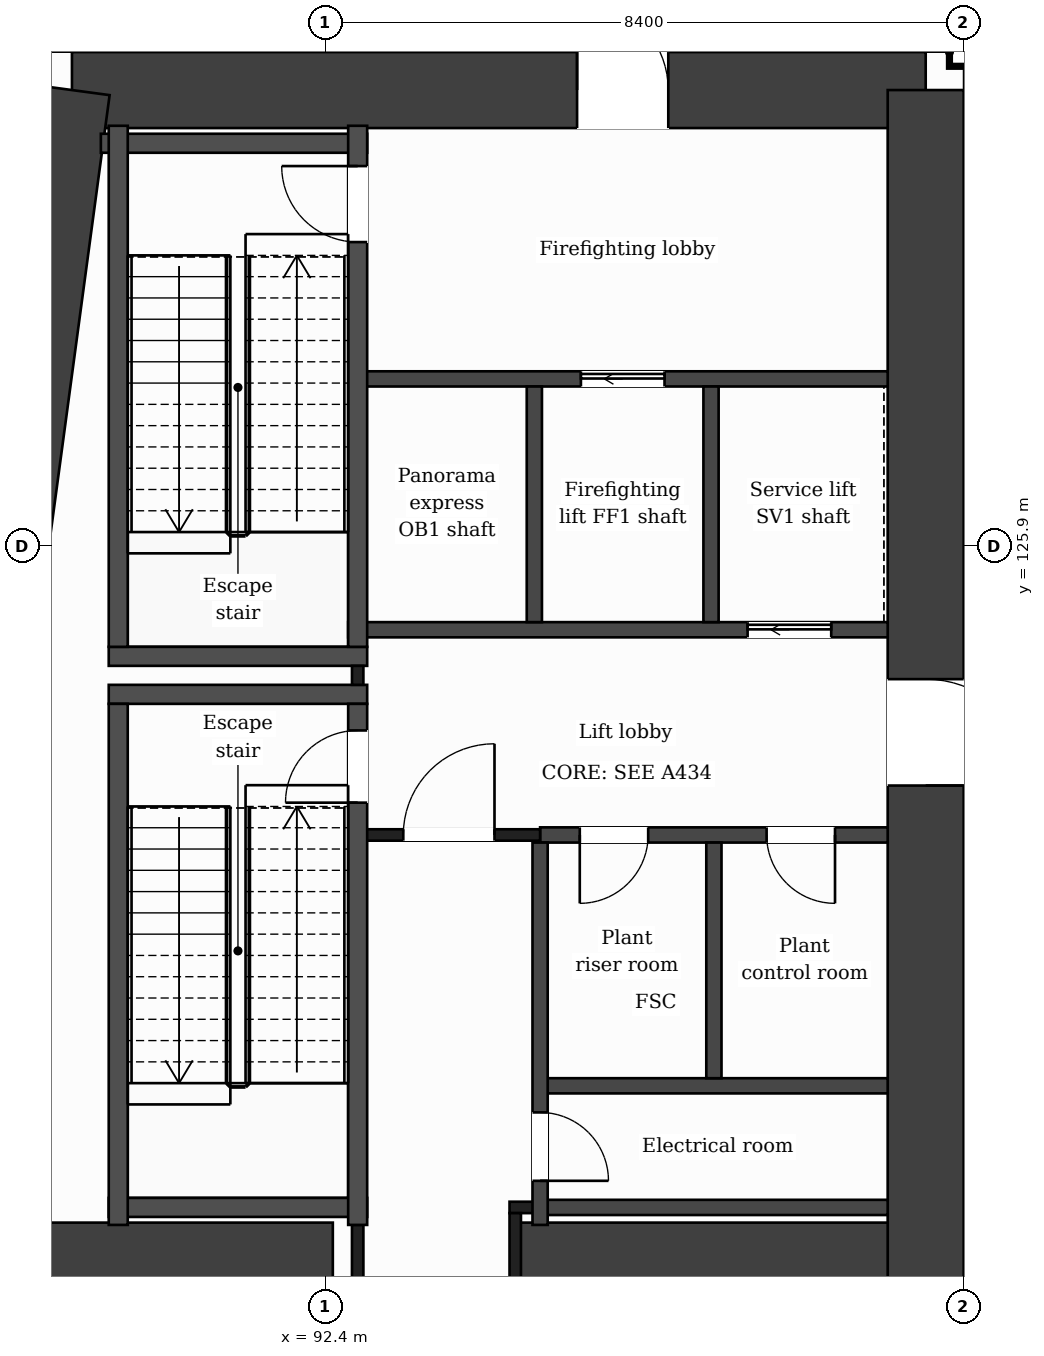
"""IFC4 building model, lengths in metres.
Left out: names, types, materials, properties, quantities, classifications, styles, units other than length and angle.
Written with IfcOpenShell. Run it as: python <this file> out.ifc"""

import sys

from ifc_helpers import new_model, si_unit, direction, frame, frame_2d, origin, place, context, subcontext, project, spatial, rectangle, extrude, element, fill, save


model = new_model("IFC4")
c1 = context("Model", 3, precision=1e-05, world=origin(), true_north=direction((0.0, 1.0)))
c2 = subcontext(c1, "Body", "Model", "MODEL_VIEW")
j1 = project(units=[si_unit("LENGTHUNIT", "METRE"), si_unit("PLANEANGLEUNIT", "RADIAN")], contexts=[c1])
p1 = place(None, origin())
s1 = spatial("IfcSite", under=j1, at=p1, CompositionType="ELEMENT")
p2 = place(p1, origin())
s2 = spatial("IfcBuilding", under=s1, at=p2, CompositionType="ELEMENT")
p3 = place(p2, frame((0.0, 0.0, 142.8)))
s3 = spatial("IfcBuildingStorey", under=s2, at=p3, CompositionType="ELEMENT", Elevation=142.8)
p4 = place(p3, frame((89.068, 131.9, 0.0), z_axis=(0.0, 0.0, 1.0), x_axis=(1.0, 0.0, 0.0)))
e1 = element("IfcWall", 1, at=p4, inside=s3, PredefinedType="SHEAR", context=c2, shape_type="SweptSolid", body=[
    extrude(rectangle(XDim=11.232, YDim=1.0, at=frame_2d((5.616, 0.0))), origin(), (0.0, 0.0, 1.0), 5.0),
])
p5 = place(p4, frame((6.646, 0.0, 0.0)))
e2 = element("IfcOpeningElement", 2, at=p5, cuts=e1, PredefinedType="OPENING", context=c2, shape_type="SweptSolid", body=[
    extrude(rectangle(XDim=1.2, YDim=2.1, at=frame_2d((0.6, 1.05))), frame((0.0, 0.51, 0.0), z_axis=(0.0, -1.0, 0.0), x_axis=(1.0, 0.0, 0.0)), (0.0, 0.0, 1.0), 1.02),
])
p6 = place(p3, frame((100.3, 131.9, 0.0), z_axis=(0.0, 0.0, 1.0), x_axis=(0.0, -1.0, 0.0)))
e3 = element("IfcWall", 3, at=p6, inside=s3, PredefinedType="SHEAR", context=c2, shape_type="SweptSolid", body=[
    extrude(rectangle(XDim=21.0, YDim=1.0, at=frame_2d((10.5, 0.0))), origin(), (0.0, 0.0, 1.0), 5.0),
])
p7 = place(p6, frame((18.7, 0.0, 0.0)))
e4 = element("IfcOpeningElement", 4, at=p7, cuts=e3, PredefinedType="OPENING", context=c2, shape_type="SweptSolid", body=[
    extrude(rectangle(XDim=1.2, YDim=2.1, at=frame_2d((0.6, 1.05))), frame((0.0, 0.51, 0.0), z_axis=(0.0, -1.0, 0.0), x_axis=(1.0, 0.0, 0.0)), (0.0, 0.0, 1.0), 1.02),
])
p8 = place(p6, frame((7.75, 0.0, 0.0)))
e5 = element("IfcOpeningElement", 5, at=p8, cuts=e3, PredefinedType="OPENING", context=c2, shape_type="SweptSolid", body=[
    extrude(rectangle(XDim=1.4, YDim=2.1, at=frame_2d((0.7, 1.05))), frame((0.0, 0.51, 0.0), z_axis=(0.0, -1.0, 0.0), x_axis=(1.0, 0.0, 0.0)), (0.0, 0.0, 1.0), 1.02),
])
p9 = place(p3, frame((86.241, 110.9, 0.0), z_axis=(0.0, 0.0, 1.0), x_axis=(0.133411141623, 0.991060778808, 0.0)))
e6 = element("IfcWall", 6, at=p9, inside=s3, PredefinedType="SHEAR", context=c2, shape_type="SweptSolid", body=[
    extrude(rectangle(XDim=21.189, YDim=1.0, at=frame_2d((10.595, 0.0))), origin(), (0.0, 0.0, 1.0), 5.0),
])
p10 = place(p3, frame((87.423, 116.5, 0.0), z_axis=(0.0, 0.0, 1.0), x_axis=(1.0, 0.0, 0.0)))
e7 = element("IfcWall", 7, at=p10, inside=s3, PredefinedType="SHEAR", context=c2, shape_type="SweptSolid", body=[
    extrude(rectangle(XDim=5.077, YDim=1.0, at=frame_2d((2.539, 0.0))), origin(), (0.0, 0.0, 1.0), 5.0),
])
p11 = place(p3, frame((94.9, 116.5, 0.0), z_axis=(0.0, 0.0, 1.0), x_axis=(1.0, 0.0, 0.0)))
e8 = element("IfcWall", 8, at=p11, inside=s3, PredefinedType="SHEAR", context=c2, shape_type="SweptSolid", body=[
    extrude(rectangle(XDim=4.9, YDim=1.0, at=frame_2d((2.45, 0.0))), origin(), (0.0, 0.0, 1.0), 5.0),
])
p12 = place(p3, frame((91.177, 138.95, 0.0), z_axis=(0.0, 0.0, 1.0), x_axis=(-0.133426664613, -0.991058689065, 0.0)))
e9 = element("IfcWall", 9, at=p12, inside=s3, PredefinedType="SOLIDWALL", context=c2, shape_type="SweptSolid", body=[
    extrude(rectangle(XDim=6.609, YDim=0.3, at=frame_2d((3.305, 0.0))), origin(), (0.0, 0.0, 1.0), 4.68),
])
p13 = place(p12, frame((4.294, 0.0, 0.0)))
e10 = element("IfcOpeningElement", 10, at=p13, cuts=e9, PredefinedType="OPENING", context=c2, shape_type="SweptSolid", body=[
    extrude(rectangle(XDim=1.2, YDim=2.4, at=frame_2d((0.6, 1.2))), frame((0.0, 0.16, 0.0), z_axis=(0.0, -1.0, 0.0), x_axis=(1.0, 0.0, 0.0)), (0.0, 0.0, 1.0), 0.32),
])
p14 = place(p3, frame((95.227, 117.2, 0.0), z_axis=(0.0, 0.0, 1.0), x_axis=(1.0, 0.0, 0.0)))
e11 = element("IfcWall", 11, at=p14, inside=s3, PredefinedType="PARTITIONING", context=c2, shape_type="SweptSolid", body=[
    extrude(rectangle(XDim=4.573, YDim=0.2, at=frame_2d((2.287, 0.0))), origin(), (0.0, 0.0, 1.0), 4.68),
])
p15 = place(p3, frame((94.825, 117.2, 0.0), z_axis=(0.0, 0.0, 1.0), x_axis=(1.0, 0.0, 0.0)))
e12 = element("IfcWall", 12, at=p15, inside=s3, PredefinedType="PARTITIONING", context=c2, shape_type="SweptSolid", body=[
    extrude(rectangle(XDim=0.402, YDim=0.15, at=frame_2d((0.201, 0.0))), origin(), (0.0, 0.0, 1.0), 4.68),
])
p16 = place(p3, frame((89.552, 117.2, 0.0), z_axis=(0.0, 0.0, 1.0), x_axis=(1.0, 0.0, 0.0)))
e13 = element("IfcWall", 13, at=p16, inside=s3, PredefinedType="PARTITIONING", context=c2, shape_type="SweptSolid", body=[
    extrude(rectangle(XDim=3.4, YDim=0.25, at=frame_2d((1.7, 0.0))), origin(), (0.0, 0.0, 1.0), 4.68),
])
p17 = place(p3, frame((95.227, 118.8, 0.0), z_axis=(0.0, 0.0, 1.0), x_axis=(1.0, 0.0, 0.0)))
e14 = element("IfcWall", 14, at=p17, inside=s3, PredefinedType="PARTITIONING", context=c2, shape_type="SweptSolid", body=[
    extrude(rectangle(XDim=4.573, YDim=0.2, at=frame_2d((2.287, 0.0))), origin(), (0.0, 0.0, 1.0), 4.68),
])
p18 = place(p3, frame((95.227, 122.1, 0.0), z_axis=(0.0, 0.0, 1.0), x_axis=(1.0, 0.0, 0.0)))
e15 = element("IfcWall", 15, at=p18, inside=s3, PredefinedType="PARTITIONING", context=c2, shape_type="SweptSolid", body=[
    extrude(rectangle(XDim=4.573, YDim=0.2, at=frame_2d((2.287, 0.0))), origin(), (0.0, 0.0, 1.0), 4.68),
])
p19 = place(p18, frame((0.522, 0.0, 0.0)))
e16 = element("IfcOpeningElement", 16, at=p19, cuts=e15, PredefinedType="OPENING", context=c2, shape_type="SweptSolid", body=[
    extrude(rectangle(XDim=0.9, YDim=2.1, at=frame_2d((0.45, 1.05))), frame((0.0, 0.11, 0.0), z_axis=(0.0, -1.0, 0.0), x_axis=(1.0, 0.0, 0.0)), (0.0, 0.0, 1.0), 0.22),
])
p20 = place(p18, frame((2.98, 0.0, 0.0)))
e17 = element("IfcOpeningElement", 17, at=p20, cuts=e15, PredefinedType="OPENING", context=c2, shape_type="SweptSolid", body=[
    extrude(rectangle(XDim=0.9, YDim=2.1, at=frame_2d((0.45, 1.05))), frame((0.0, 0.11, 0.0), z_axis=(0.0, -1.0, 0.0), x_axis=(1.0, 0.0, 0.0)), (0.0, 0.0, 1.0), 0.22),
])
p21 = place(p3, frame((92.827, 122.1, 0.0), z_axis=(0.0, 0.0, 1.0), x_axis=(1.0, 0.0, 0.0)))
e18 = element("IfcWall", 18, at=p21, inside=s3, PredefinedType="PARTITIONING", context=c2, shape_type="SweptSolid", body=[
    extrude(rectangle(XDim=2.4, YDim=0.15, at=frame_2d((1.2, 0.0))), origin(), (0.0, 0.0, 1.0), 4.68),
])
p22 = place(p21, frame((0.6, 0.0, 0.0)))
e19 = element("IfcOpeningElement", 19, at=p22, cuts=e18, PredefinedType="OPENING", context=c2, shape_type="SweptSolid", body=[
    extrude(rectangle(XDim=1.2, YDim=2.1, at=frame_2d((0.6, 1.05))), frame((0.0, 0.085, 0.0), z_axis=(0.0, -1.0, 0.0), x_axis=(1.0, 0.0, 0.0)), (0.0, 0.0, 1.0), 0.17),
])
for number, where, z_axis, x_axis in (
    (20, (89.552, 123.95, 0.0), (0.0, 0.0, 1.0), (1.0, 0.0, 0.0)),
    (21, (89.552, 124.45, 0.0), (0.0, 0.0, 1.0), (1.0, 0.0, 0.0)),
):
    element("IfcWall", number, at=place(p3, frame(where, z_axis=z_axis, x_axis=x_axis)), inside=s3, PredefinedType="PARTITIONING", context=c2, shape_type="SweptSolid", body=[
        extrude(rectangle(XDim=3.4, YDim=0.25, at=frame_2d((1.7, 0.0))), origin(), (0.0, 0.0, 1.0), 4.68),
    ])
p23 = place(p3, frame((92.702, 124.8, 0.0), z_axis=(0.0, 0.0, 1.0), x_axis=(1.0, 0.0, 0.0)))
e22 = element("IfcWall", 22, at=p23, inside=s3, PredefinedType="PARTITIONING", context=c2, shape_type="SweptSolid", body=[
    extrude(rectangle(XDim=7.098, YDim=0.2, at=frame_2d((3.549, 0.0))), origin(), (0.0, 0.0, 1.0), 4.68),
])
p24 = place(p23, frame((5.255, 0.0, 0.0)))
e23 = element("IfcOpeningElement", 23, at=p24, cuts=e22, PredefinedType="OPENING", context=c2, shape_type="SweptSolid", body=[
    extrude(rectangle(XDim=1.1, YDim=2.1, at=frame_2d((0.55, 1.05))), frame((0.0, 0.11, 0.0), z_axis=(0.0, -1.0, 0.0), x_axis=(1.0, 0.0, 0.0)), (0.0, 0.0, 1.0), 0.22),
])
p25 = place(p3, frame((92.827, 128.1, 0.0), z_axis=(0.0, 0.0, 1.0), x_axis=(1.0, 0.0, 0.0)))
e24 = element("IfcWall", 24, at=p25, inside=s3, PredefinedType="PARTITIONING", context=c2, shape_type="SweptSolid", body=[
    extrude(rectangle(XDim=6.973, YDim=0.2, at=frame_2d((3.487, 0.0))), origin(), (0.0, 0.0, 1.0), 4.68),
])
p26 = place(p25, frame((2.937, 0.0, 0.0)))
e25 = element("IfcOpeningElement", 25, at=p26, cuts=e24, PredefinedType="OPENING", context=c2, shape_type="SweptSolid", body=[
    extrude(rectangle(XDim=1.1, YDim=2.1, at=frame_2d((0.55, 1.05))), frame((0.0, 0.11, 0.0), z_axis=(0.0, -1.0, 0.0), x_axis=(1.0, 0.0, 0.0)), (0.0, 0.0, 1.0), 0.22),
])
p27 = place(p3, frame((89.448, 131.2, 0.0), z_axis=(0.0, 0.0, 1.0), x_axis=(1.0, 0.0, 0.0)))
e26 = element("IfcWall", 26, at=p27, inside=s3, PredefinedType="PARTITIONING", context=c2, shape_type="SweptSolid", body=[
    extrude(rectangle(XDim=3.504, YDim=0.25, at=frame_2d((1.752, 0.0))), origin(), (0.0, 0.0, 1.0), 4.68),
])
p28 = place(p3, frame((100.7, 132.4, 0.0), z_axis=(0.0, 0.0, 1.0), x_axis=(1.0, 0.0, 0.0)))
e27 = element("IfcWall", 27, at=p28, inside=s3, PredefinedType="PARTITIONING", context=c2, shape_type="SweptSolid", body=[
    extrude(rectangle(XDim=25.4, YDim=0.2, at=frame_2d((12.7, 0.0))), origin(), (0.0, 0.0, 1.0), 4.68),
])
p29 = place(p28, frame((3.7, 0.0, 0.0)))
e28 = element("IfcOpeningElement", 28, at=p29, cuts=e27, PredefinedType="OPENING", context=c2, shape_type="SweptSolid", body=[
    extrude(rectangle(XDim=1.2, YDim=2.1, at=frame_2d((0.6, 1.05))), frame((0.0, 0.11, 0.0), z_axis=(0.0, -1.0, 0.0), x_axis=(1.0, 0.0, 0.0)), (0.0, 0.0, 1.0), 0.22),
])
for number, where, z_axis, x_axis in (
    (29, (89.677, 116.97, 0.0), (0.0, 0.0, 1.0), (0.0, 1.0, 0.0)),
    (30, (89.677, 124.575, 0.0), (0.0, 0.0, 1.0), (0.0, 1.0, 0.0)),
):
    element("IfcWall", number, at=place(p3, frame(where, z_axis=z_axis, x_axis=x_axis)), inside=s3, PredefinedType="PARTITIONING", context=c2, shape_type="SweptSolid", body=[
        extrude(rectangle(XDim=6.855, YDim=0.25, at=frame_2d((3.427, 0.0))), origin(), (0.0, 0.0, 1.0), 4.68),
    ])
p30 = place(p3, frame((92.827, 116.0, 0.0), z_axis=(0.0, 0.0, 1.0), x_axis=(0.0, 1.0, 0.0)))
e31 = element("IfcWall", 31, at=p30, inside=s3, PredefinedType="PARTITIONING", context=c2, shape_type="SweptSolid", body=[
    extrude(rectangle(XDim=0.97, YDim=0.15, at=frame_2d((0.485, 0.0))), origin(), (0.0, 0.0, 1.0), 4.68),
])
p31 = place(p3, frame((92.827, 124.075, 0.0), z_axis=(0.0, 0.0, 1.0), x_axis=(0.0, 1.0, 0.0)))
e32 = element("IfcWall", 32, at=p31, inside=s3, PredefinedType="PARTITIONING", context=c2, shape_type="SweptSolid", body=[
    extrude(rectangle(XDim=0.25, YDim=0.15, at=frame_2d((0.125, 0.0))), origin(), (0.0, 0.0, 1.0), 4.68),
])
p32 = place(p3, frame((92.827, 116.97, 0.0), z_axis=(0.0, 0.0, 1.0), x_axis=(0.0, 1.0, 0.0)))
e33 = element("IfcWall", 33, at=p32, inside=s3, PredefinedType="PARTITIONING", context=c2, shape_type="SweptSolid", body=[
    extrude(rectangle(XDim=6.855, YDim=0.25, at=frame_2d((3.427, 0.0))), origin(), (0.0, 0.0, 1.0), 4.68),
])
p33 = place(p32, frame((5.555, 0.0, 0.0)))
e34 = element("IfcOpeningElement", 34, at=p33, cuts=e33, PredefinedType="OPENING", context=c2, shape_type="SweptSolid", body=[
    extrude(rectangle(XDim=0.95, YDim=2.1, at=frame_2d((0.475, 1.05))), frame((0.0, 0.135, 0.0), z_axis=(0.0, -1.0, 0.0), x_axis=(1.0, 0.0, 0.0)), (0.0, 0.0, 1.0), 0.27),
])
p34 = place(p3, frame((92.827, 124.575, 0.0), z_axis=(0.0, 0.0, 1.0), x_axis=(0.0, 1.0, 0.0)))
e35 = element("IfcWall", 35, at=p34, inside=s3, PredefinedType="PARTITIONING", context=c2, shape_type="SweptSolid", body=[
    extrude(rectangle(XDim=6.855, YDim=0.25, at=frame_2d((3.427, 0.0))), origin(), (0.0, 0.0, 1.0), 4.68),
])
p35 = place(p34, frame((5.325, 0.0, 0.0)))
e36 = element("IfcOpeningElement", 36, at=p35, cuts=e35, PredefinedType="OPENING", context=c2, shape_type="SweptSolid", body=[
    extrude(rectangle(XDim=1.0, YDim=2.1, at=frame_2d((0.5, 1.05))), frame((0.0, 0.135, 0.0), z_axis=(0.0, -1.0, 0.0), x_axis=(1.0, 0.0, 0.0)), (0.0, 0.0, 1.0), 0.27),
])
p36 = place(p3, frame((94.9, 116.0, 0.0), z_axis=(0.0, 0.0, 1.0), x_axis=(0.0, 1.0, 0.0)))
e37 = element("IfcWall", 37, at=p36, inside=s3, PredefinedType="PARTITIONING", context=c2, shape_type="SweptSolid", body=[
    extrude(rectangle(XDim=1.125, YDim=0.15, at=frame_2d((0.562, 0.0))), origin(), (0.0, 0.0, 1.0), 4.68),
])
p37 = place(p3, frame((95.151, 124.9, 0.0), z_axis=(0.0, 0.0, 1.0), x_axis=(0.0, 1.0, 0.0)))
e38 = element("IfcWall", 38, at=p37, inside=s3, PredefinedType="PARTITIONING", context=c2, shape_type="SweptSolid", body=[
    extrude(rectangle(XDim=3.1, YDim=0.2, at=frame_2d((1.55, 0.0))), origin(), (0.0, 0.0, 1.0), 4.68),
])
p38 = place(p3, frame((95.227, 116.97, 0.0), z_axis=(0.0, 0.0, 1.0), x_axis=(0.0, 1.0, 0.0)))
e39 = element("IfcWall", 39, at=p38, inside=s3, PredefinedType="PARTITIONING", context=c2, shape_type="SweptSolid", body=[
    extrude(rectangle(XDim=5.03, YDim=0.2, at=frame_2d((2.515, 0.0))), origin(), (0.0, 0.0, 1.0), 4.68),
])
p39 = place(p38, frame((0.58, 0.0, 0.0)))
e40 = element("IfcOpeningElement", 40, at=p39, cuts=e39, PredefinedType="OPENING", context=c2, shape_type="SweptSolid", body=[
    extrude(rectangle(XDim=0.9, YDim=2.1, at=frame_2d((0.45, 1.05))), frame((0.0, 0.11, 0.0), z_axis=(0.0, -1.0, 0.0), x_axis=(1.0, 0.0, 0.0)), (0.0, 0.0, 1.0), 0.22),
])
for number, where, z_axis, x_axis in (
    (41, (97.476, 124.9, 0.0), (0.0, 0.0, 1.0), (0.0, 1.0, 0.0)),
    (42, (97.513, 118.9, 0.0), (0.0, 0.0, 1.0), (0.0, 1.0, 0.0)),
):
    element("IfcWall", number, at=place(p3, frame(where, z_axis=z_axis, x_axis=x_axis)), inside=s3, PredefinedType="PARTITIONING", context=c2, shape_type="SweptSolid", body=[
        extrude(rectangle(XDim=3.1, YDim=0.2, at=frame_2d((1.55, 0.0))), origin(), (0.0, 0.0, 1.0), 4.68),
    ])
p40 = place(p22, origin())
e43 = element("IfcDoor", 43, at=p40, inside=s3, OperationType="SINGLE_SWING_RIGHT", PredefinedType="DOOR", context=c2, shape_type="SweptSolid", body=[
    extrude(rectangle(XDim=1.2, YDim=2.1, at=frame_2d((0.6, 1.05))), frame((0.0, 0.025, 0.0), z_axis=(0.0, -1.0, 0.0), x_axis=(1.0, 0.0, 0.0)), (0.0, 0.0, 1.0), 0.05),
])
fill(e19, e43)
p41 = place(p26, origin())
e44 = element("IfcDoor", 44, at=p41, inside=s3, OperationType="SLIDING_TO_LEFT", PredefinedType="DOOR", context=c2, shape_type="SweptSolid", body=[
    extrude(rectangle(XDim=1.1, YDim=2.1, at=frame_2d((0.55, 1.05))), frame((0.0, 0.025, 0.0), z_axis=(0.0, -1.0, 0.0), x_axis=(1.0, 0.0, 0.0)), (0.0, 0.0, 1.0), 0.05),
])
fill(e25, e44)
p42 = place(p24, origin())
e45 = element("IfcDoor", 45, at=p42, inside=s3, OperationType="SLIDING_TO_LEFT", PredefinedType="DOOR", context=c2, shape_type="SweptSolid", body=[
    extrude(rectangle(XDim=1.1, YDim=2.1, at=frame_2d((0.55, 1.05))), frame((0.0, 0.025, 0.0), z_axis=(0.0, -1.0, 0.0), x_axis=(1.0, 0.0, 0.0)), (0.0, 0.0, 1.0), 0.05),
])
fill(e23, e45)
p43 = place(p19, origin())
e46 = element("IfcDoor", 46, at=p43, inside=s3, OperationType="SINGLE_SWING_LEFT", PredefinedType="DOOR", context=c2, shape_type="SweptSolid", body=[
    extrude(rectangle(XDim=0.9, YDim=2.1, at=frame_2d((0.45, 1.05))), frame((0.0, 0.025, 0.0), z_axis=(0.0, -1.0, 0.0), x_axis=(1.0, 0.0, 0.0)), (0.0, 0.0, 1.0), 0.05),
])
fill(e16, e46)
p44 = place(p20, origin())
e47 = element("IfcDoor", 47, at=p44, inside=s3, OperationType="SINGLE_SWING_RIGHT", PredefinedType="DOOR", context=c2, shape_type="SweptSolid", body=[
    extrude(rectangle(XDim=0.9, YDim=2.1, at=frame_2d((0.45, 1.05))), frame((0.0, 0.025, 0.0), z_axis=(0.0, -1.0, 0.0), x_axis=(1.0, 0.0, 0.0)), (0.0, 0.0, 1.0), 0.05),
])
fill(e17, e47)
p45 = place(p33, origin())
e48 = element("IfcDoor", 48, at=p45, inside=s3, OperationType="SINGLE_SWING_LEFT", PredefinedType="DOOR", context=c2, shape_type="SweptSolid", body=[
    extrude(rectangle(XDim=0.95, YDim=2.1, at=frame_2d((0.475, 1.05))), frame((0.0, 0.025, 0.0), z_axis=(0.0, -1.0, 0.0), x_axis=(1.0, 0.0, 0.0)), (0.0, 0.0, 1.0), 0.05),
])
fill(e34, e48)
p46 = place(p35, origin())
e49 = element("IfcDoor", 49, at=p46, inside=s3, OperationType="SINGLE_SWING_RIGHT", PredefinedType="DOOR", context=c2, shape_type="SweptSolid", body=[
    extrude(rectangle(XDim=1.0, YDim=2.1, at=frame_2d((0.5, 1.05))), frame((0.0, 0.025, 0.0), z_axis=(0.0, -1.0, 0.0), x_axis=(1.0, 0.0, 0.0)), (0.0, 0.0, 1.0), 0.05),
])
fill(e36, e49)
p47 = place(p39, origin())
e50 = element("IfcDoor", 50, at=p47, inside=s3, OperationType="SINGLE_SWING_LEFT", PredefinedType="DOOR", context=c2, shape_type="SweptSolid", body=[
    extrude(rectangle(XDim=0.9, YDim=2.1, at=frame_2d((0.45, 1.05))), frame((0.0, 0.025, 0.0), z_axis=(0.0, -1.0, 0.0), x_axis=(1.0, 0.0, 0.0)), (0.0, 0.0, 1.0), 0.05),
])
fill(e40, e50)
p48 = place(p5, origin())
e51 = element("IfcDoor", 51, at=p48, inside=s3, OperationType="SINGLE_SWING_LEFT", PredefinedType="DOOR", context=c2, shape_type="SweptSolid", body=[
    extrude(rectangle(XDim=1.2, YDim=2.1, at=frame_2d((0.6, 1.05))), frame((0.0, 0.025, 0.0), z_axis=(0.0, -1.0, 0.0), x_axis=(1.0, 0.0, 0.0)), (0.0, 0.0, 1.0), 0.05),
])
fill(e2, e51)
p49 = place(p8, origin())
e52 = element("IfcDoor", 52, at=p49, inside=s3, OperationType="SINGLE_SWING_RIGHT", PredefinedType="DOOR", context=c2, shape_type="SweptSolid", body=[
    extrude(rectangle(XDim=1.4, YDim=2.1, at=frame_2d((0.7, 1.05))), frame((0.0, 0.025, 0.0), z_axis=(0.0, -1.0, 0.0), x_axis=(1.0, 0.0, 0.0)), (0.0, 0.0, 1.0), 0.05),
])
fill(e5, e52)
save(model, sys.argv[1])
